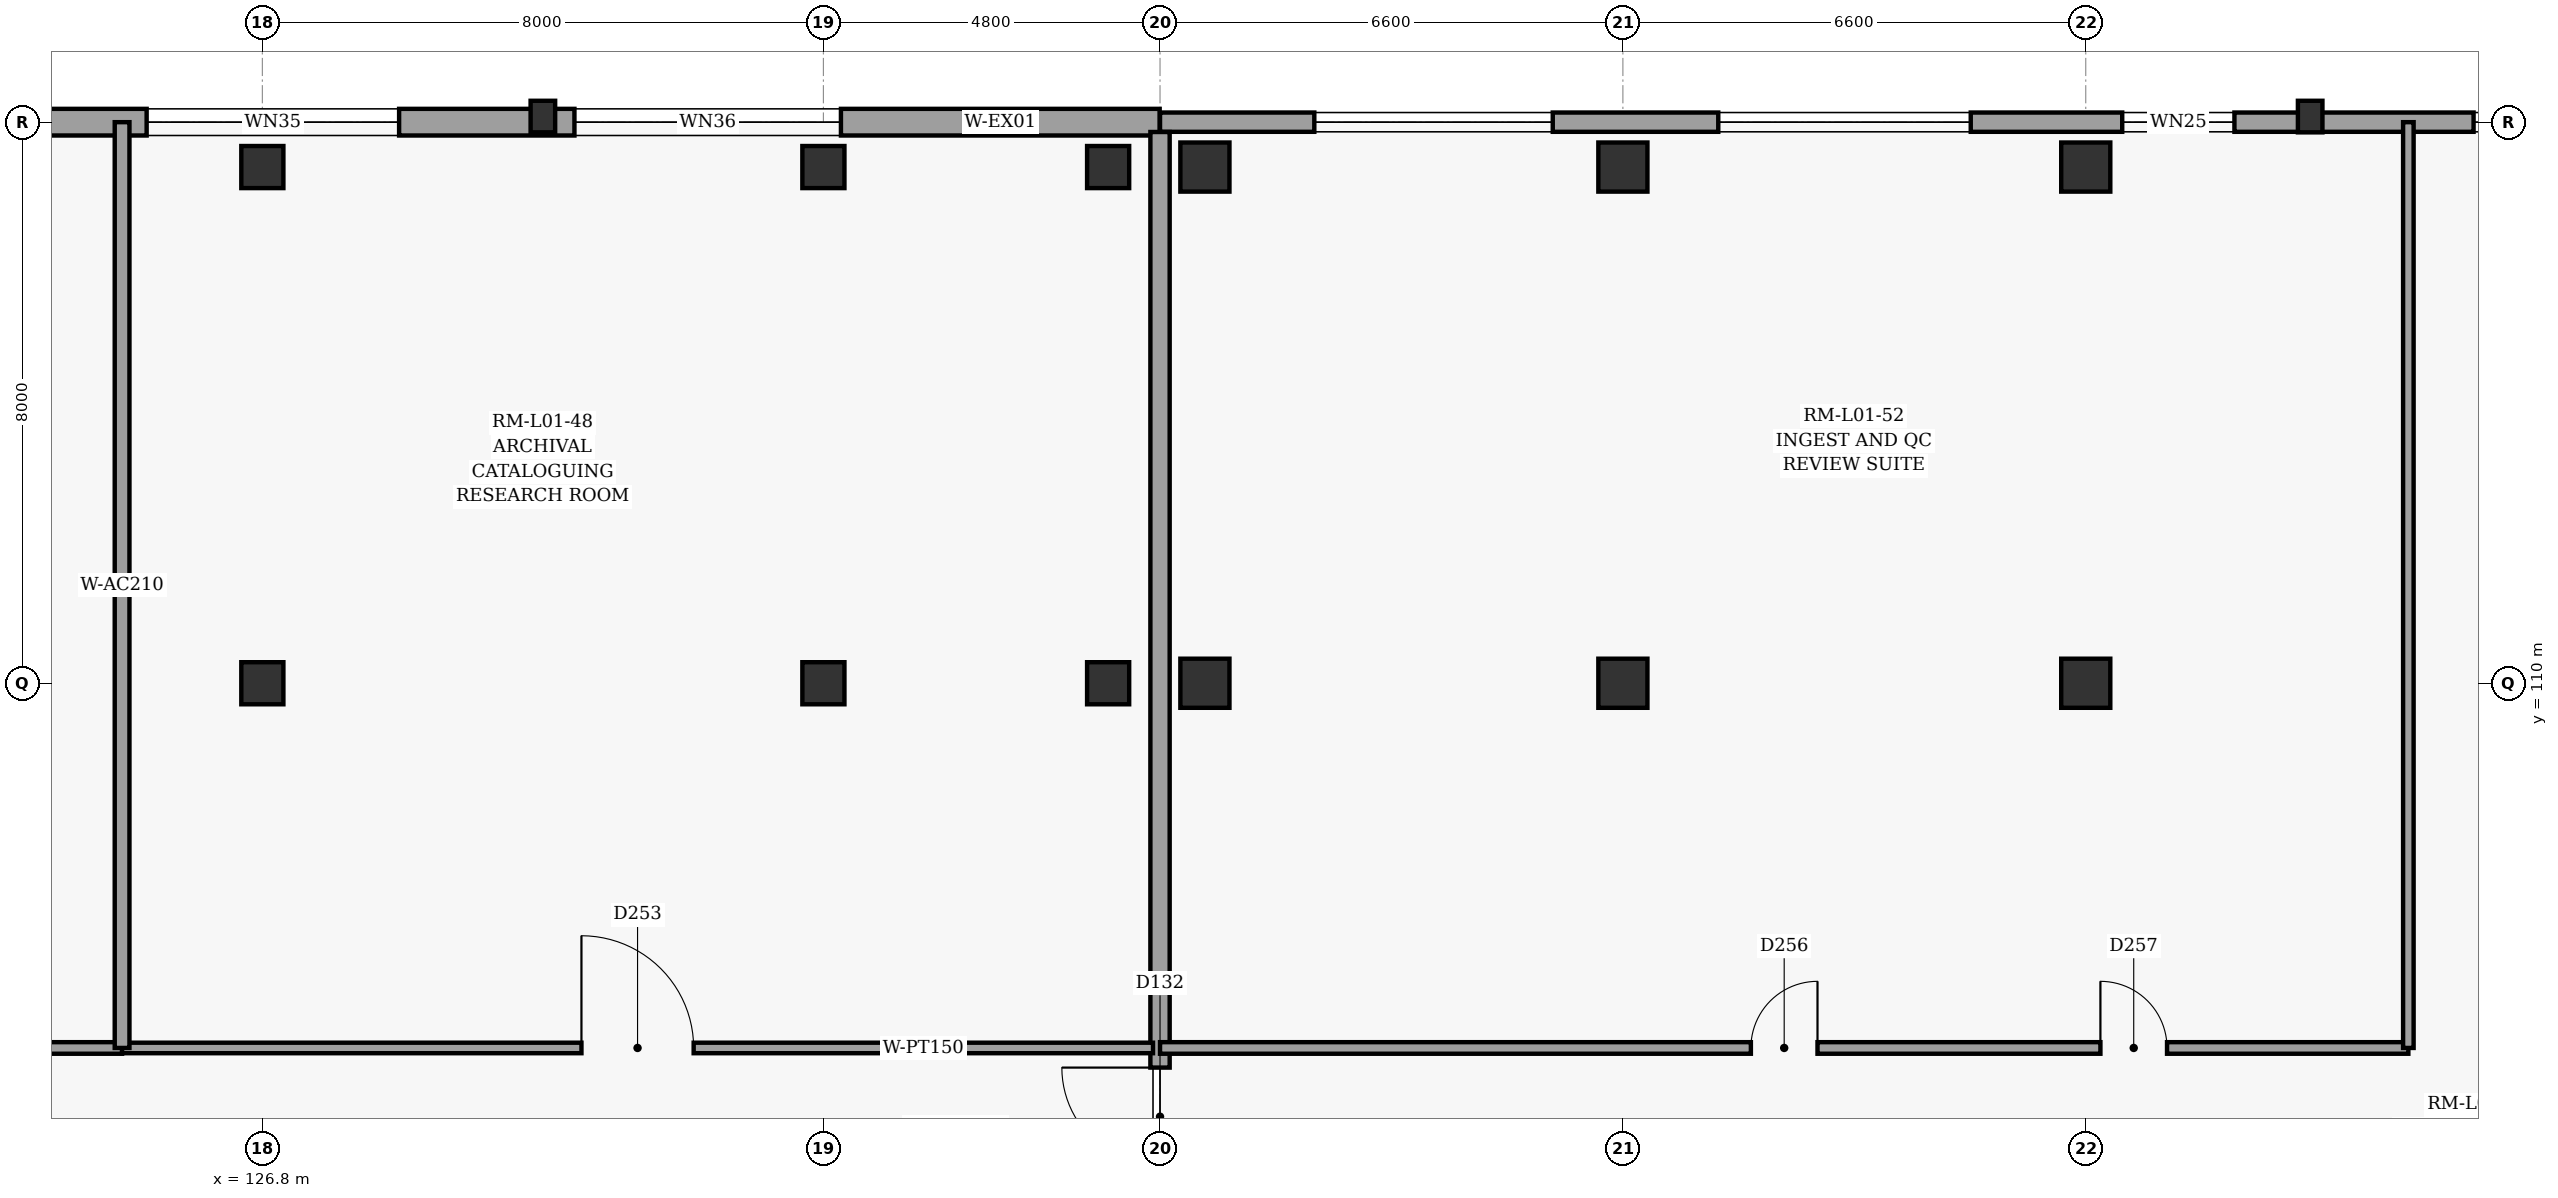
"""IFC4 building model, lengths in metres.
Left out: names, types, materials, properties, quantities, classifications, styles, units other than length and angle.
Written with IfcOpenShell. Run it as: python <this file> out.ifc"""

import sys

from ifc_helpers import new_model, si_unit, direction, frame, frame_2d, origin, origin_2d, place, context, subcontext, project, spatial, rectangle, extrude, element, fill, save


model = new_model("IFC4")
c1 = context("Model", 3, precision=1e-05, world=origin(), true_north=direction((0.0, 1.0)))
c2 = subcontext(c1, "Body", "Model", "MODEL_VIEW")
j1 = project(units=[si_unit("LENGTHUNIT", "METRE"), si_unit("PLANEANGLEUNIT", "RADIAN")], contexts=[c1])
p1 = place(None, origin())
s1 = spatial("IfcSite", under=j1, at=p1, CompositionType="ELEMENT")
p2 = place(p1, origin())
s2 = spatial("IfcBuilding", under=s1, at=p2, CompositionType="ELEMENT")
p3 = place(p2, frame((0.0, 0.0, 5.4)))
s3 = spatial("IfcBuildingStorey", under=s2, at=p3, CompositionType="ELEMENT", Elevation=5.4)
for number, where, z_axis, x_axis in (
    (1, (126.8, 110.0, 0.0), (0.0, 0.0, 1.0), (1.0, 0.0, 0.0)),
    (2, (126.8, 117.36, 0.0), (0.0, 0.0, 1.0), (1.0, 0.0, 0.0)),
    (3, (134.8, 110.0, 0.0), (0.0, 0.0, 1.0), (1.0, 0.0, 0.0)),
    (4, (134.8, 117.36, 0.0), (0.0, 0.0, 1.0), (1.0, 0.0, 0.0)),
    (5, (138.86, 110.0, 0.0), (0.0, 0.0, 1.0), (1.0, 0.0, 0.0)),
    (6, (138.86, 117.36, 0.0), (0.0, 0.0, 1.0), (1.0, 0.0, 0.0)),
):
    element("IfcColumn", number, at=place(p3, frame(where, z_axis=z_axis, x_axis=x_axis)), inside=s3, PredefinedType="COLUMN", context=c2, shape_type="SweptSolid", body=[
        extrude(rectangle(XDim=0.6, YDim=0.6, at=origin_2d()), origin(), (0.0, 0.0, 1.0), 4.8),
    ])
for number, where, z_axis, x_axis in (
    (7, (140.24, 110.0, 0.0), (0.0, 0.0, 1.0), (1.0, 0.0, 0.0)),
    (8, (140.24, 117.36, 0.0), (0.0, 0.0, 1.0), (1.0, 0.0, 0.0)),
    (9, (146.2, 110.0, 0.0), (0.0, 0.0, 1.0), (1.0, 0.0, 0.0)),
    (10, (146.2, 117.36, 0.0), (0.0, 0.0, 1.0), (1.0, 0.0, 0.0)),
    (11, (152.8, 110.0, 0.0), (0.0, 0.0, 1.0), (1.0, 0.0, 0.0)),
    (12, (152.8, 117.36, 0.0), (0.0, 0.0, 1.0), (1.0, 0.0, 0.0)),
):
    element("IfcColumn", number, at=place(p3, frame(where, z_axis=z_axis, x_axis=x_axis)), inside=s3, PredefinedType="COLUMN", context=c2, shape_type="SweptSolid", body=[
        extrude(rectangle(XDim=0.7, YDim=0.7, at=origin_2d()), origin(), (0.0, 0.0, 1.0), 4.8),
    ])
for number, where, z_axis, x_axis in (
    (13, (130.8, 118.08, 0.0), (0.0, 0.0, 1.0), (0.0, 1.0, 0.0)),
    (14, (156.0, 118.08, 0.0), (0.0, 0.0, 1.0), (0.0, 1.0, 0.0)),
):
    element("IfcColumn", number, at=place(p3, frame(where, z_axis=z_axis, x_axis=x_axis)), inside=s3, PredefinedType="PILASTER", context=c2, shape_type="SweptSolid", body=[
        extrude(rectangle(XDim=0.35, YDim=0.45, at=origin_2d()), origin(), (0.0, 0.0, 1.0), 4.8),
    ])
p4 = place(p3, frame((94.8, 118.0, 0.0), z_axis=(0.0, 0.0, 1.0), x_axis=(1.0, 0.0, 0.0)))
e15 = element("IfcWall", 15, at=p4, inside=s3, PredefinedType="SOLIDWALL", context=c2, shape_type="SweptSolid", body=[
    extrude(rectangle(XDim=44.795, YDim=0.38, at=frame_2d((22.397, 0.0))), origin(), (0.0, 0.0, 1.0), 4.54),
])
p5 = place(p4, frame((0.75, 0.0, 0.9)))
e16 = element("IfcOpeningElement", 16, at=p5, cuts=e15, PredefinedType="OPENING", context=c2, shape_type="SweptSolid", body=[
    extrude(rectangle(XDim=2.8, YDim=1.8, at=frame_2d((1.4, 0.9))), frame((0.0, 0.2, 0.0), z_axis=(0.0, -1.0, 0.0), x_axis=(1.0, 0.0, 0.0)), (0.0, 0.0, 1.0), 0.4),
])
p6 = place(p4, frame((8.3, 0.0, 0.9)))
e17 = element("IfcOpeningElement", 17, at=p6, cuts=e15, PredefinedType="OPENING", context=c2, shape_type="SweptSolid", body=[
    extrude(rectangle(XDim=3.0, YDim=1.8, at=frame_2d((1.5, 0.9))), frame((0.0, 0.2, 0.0), z_axis=(0.0, -1.0, 0.0), x_axis=(1.0, 0.0, 0.0)), (0.0, 0.0, 1.0), 0.4),
])
p7 = place(p4, frame((15.9, 0.0, 0.9)))
e18 = element("IfcOpeningElement", 18, at=p7, cuts=e15, PredefinedType="OPENING", context=c2, shape_type="SweptSolid", body=[
    extrude(rectangle(XDim=3.2, YDim=1.85, at=frame_2d((1.6, 0.925))), frame((0.0, 0.2, 0.0), z_axis=(0.0, -1.0, 0.0), x_axis=(1.0, 0.0, 0.0)), (0.0, 0.0, 1.0), 0.4),
])
p8 = place(p4, frame((22.75, 0.0, 0.9)))
e19 = element("IfcOpeningElement", 19, at=p8, cuts=e15, PredefinedType="OPENING", context=c2, shape_type="SweptSolid", body=[
    extrude(rectangle(XDim=3.4, YDim=1.85, at=frame_2d((1.7, 0.925))), frame((0.0, 0.2, 0.0), z_axis=(0.0, -1.0, 0.0), x_axis=(1.0, 0.0, 0.0)), (0.0, 0.0, 1.0), 0.4),
])
p9 = place(p4, frame((30.35, 0.0, 0.9)))
e20 = element("IfcOpeningElement", 20, at=p9, cuts=e15, PredefinedType="OPENING", context=c2, shape_type="SweptSolid", body=[
    extrude(rectangle(XDim=3.6, YDim=1.9, at=frame_2d((1.8, 0.95))), frame((0.0, 0.2, 0.0), z_axis=(0.0, -1.0, 0.0), x_axis=(1.0, 0.0, 0.0)), (0.0, 0.0, 1.0), 0.4),
])
p10 = place(p4, frame((36.45, 0.0, 0.9)))
e21 = element("IfcOpeningElement", 21, at=p10, cuts=e15, PredefinedType="OPENING", context=c2, shape_type="SweptSolid", body=[
    extrude(rectangle(XDim=3.8, YDim=1.9, at=frame_2d((1.9, 0.95))), frame((0.0, 0.2, 0.0), z_axis=(0.0, -1.0, 0.0), x_axis=(1.0, 0.0, 0.0)), (0.0, 0.0, 1.0), 0.4),
])
p11 = place(p3, frame((139.6, 118.0, 0.0), z_axis=(0.0, 0.0, 1.0), x_axis=(1.0, 0.0, 0.0)))
e22 = element("IfcWall", 22, at=p11, inside=s3, PredefinedType="SOLIDWALL", context=c2, shape_type="SweptSolid", body=[
    extrude(rectangle(XDim=32.4, YDim=0.275, at=frame_2d((16.2, 0.0))), origin(), (0.0, 0.0, 1.0), 4.55),
])
p12 = place(p11, frame((2.2, 0.0, 0.9)))
e23 = element("IfcOpeningElement", 23, at=p12, cuts=e22, PredefinedType="OPENING", context=c2, shape_type="SweptSolid", body=[
    extrude(rectangle(XDim=3.4, YDim=1.85, at=frame_2d((1.7, 0.925))), frame((0.0, 0.147, 0.0), z_axis=(0.0, -1.0, 0.0), x_axis=(1.0, 0.0, 0.0)), (0.0, 0.0, 1.0), 0.295),
])
p13 = place(p11, frame((7.96, 0.0, 0.9)))
e24 = element("IfcOpeningElement", 24, at=p13, cuts=e22, PredefinedType="OPENING", context=c2, shape_type="SweptSolid", body=[
    extrude(rectangle(XDim=3.6, YDim=1.9, at=frame_2d((1.8, 0.95))), frame((0.0, 0.147, 0.0), z_axis=(0.0, -1.0, 0.0), x_axis=(1.0, 0.0, 0.0)), (0.0, 0.0, 1.0), 0.295),
])
p14 = place(p11, frame((13.72, 0.0, 0.9)))
e25 = element("IfcOpeningElement", 25, at=p14, cuts=e22, PredefinedType="OPENING", context=c2, shape_type="SweptSolid", body=[
    extrude(rectangle(XDim=1.6, YDim=1.65, at=frame_2d((0.8, 0.825))), frame((0.0, 0.147, 0.0), z_axis=(0.0, -1.0, 0.0), x_axis=(1.0, 0.0, 0.0)), (0.0, 0.0, 1.0), 0.295),
])
p15 = place(p11, frame((18.73, 0.0, 0.9)))
e26 = element("IfcOpeningElement", 26, at=p15, cuts=e22, PredefinedType="OPENING", context=c2, shape_type="SweptSolid", body=[
    extrude(rectangle(XDim=2.6, YDim=2.35, at=frame_2d((1.3, 1.175))), frame((0.0, 0.147, 0.0), z_axis=(0.0, -1.0, 0.0), x_axis=(1.0, 0.0, 0.0)), (0.0, 0.0, 1.0), 0.295),
])
p16 = place(p3, frame((139.6, 71.74, 0.0), z_axis=(0.0, 0.0, 1.0), x_axis=(0.0, 1.0, 0.0)))
e27 = element("IfcWall", 27, at=p16, inside=s3, PredefinedType="SOLIDWALL", context=c2, shape_type="SweptSolid", body=[
    extrude(rectangle(XDim=46.12, YDim=0.275, at=frame_2d((23.06, 0.0))), origin(), (0.0, 0.0, 1.0), 3.69),
])
p17 = place(p16, frame((31.38, 0.0, 0.0)))
e28 = element("IfcOpeningElement", 28, at=p17, cuts=e27, PredefinedType="OPENING", context=c2, shape_type="SweptSolid", body=[
    extrude(rectangle(XDim=1.4, YDim=2.25, at=frame_2d((0.7, 1.125))), frame((0.0, 0.147, 0.0), z_axis=(0.0, -1.0, 0.0), x_axis=(1.0, 0.0, 0.0)), (0.0, 0.0, 1.0), 0.295),
])
p18 = place(p3, frame((109.8, 104.8, 0.0), z_axis=(0.0, 0.0, 1.0), x_axis=(1.0, 0.0, 0.0)))
e29 = element("IfcWall", 29, at=p18, inside=s3, PredefinedType="PARTITIONING", context=c2, shape_type="SweptSolid", body=[
    extrude(rectangle(XDim=15.0, YDim=0.165, at=frame_2d((7.5, 0.0))), origin(), (0.0, 0.0, 1.0), 4.54),
])
p19 = place(p18, frame((7.03, 0.0, 0.0)))
e30 = element("IfcOpeningElement", 30, at=p19, cuts=e29, PredefinedType="OPENING", context=c2, shape_type="SweptSolid", body=[
    extrude(rectangle(XDim=0.94, YDim=2.15, at=frame_2d((0.47, 1.075))), frame((0.0, 0.093, 0.0), z_axis=(0.0, -1.0, 0.0), x_axis=(1.0, 0.0, 0.0)), (0.0, 0.0, 1.0), 0.185),
])
p20 = place(p3, frame((124.8, 104.8, 0.0), z_axis=(0.0, 0.0, 1.0), x_axis=(1.0, 0.0, 0.0)))
e31 = element("IfcWall", 31, at=p20, inside=s3, PredefinedType="PARTITIONING", context=c2, shape_type="SweptSolid", body=[
    extrude(rectangle(XDim=14.7, YDim=0.15, at=frame_2d((7.35, 0.0))), origin(), (0.0, 0.0, 1.0), 4.54),
])
p21 = place(p20, frame((6.55, 0.0, 0.0)))
e32 = element("IfcOpeningElement", 32, at=p21, cuts=e31, PredefinedType="OPENING", context=c2, shape_type="SweptSolid", body=[
    extrude(rectangle(XDim=1.6, YDim=2.3, at=frame_2d((0.8, 1.15))), frame((0.0, 0.085, 0.0), z_axis=(0.0, -1.0, 0.0), x_axis=(1.0, 0.0, 0.0)), (0.0, 0.0, 1.0), 0.17),
])
p22 = place(p3, frame((124.8, 118.0, 0.0), z_axis=(0.0, 0.0, 1.0), x_axis=(0.0, -1.0, 0.0)))
e33 = element("IfcWall", 33, at=p22, inside=s3, PredefinedType="PARTITIONING", context=c2, shape_type="SweptSolid", body=[
    extrude(rectangle(XDim=13.2, YDim=0.21, at=frame_2d((6.6, 0.0))), origin(), (0.0, 0.0, 1.0), 4.54),
])
p23 = place(p3, frame((139.6, 104.8, 0.0), z_axis=(0.0, 0.0, 1.0), x_axis=(1.0, 0.0, 0.0)))
e34 = element("IfcWall", 34, at=p23, inside=s3, PredefinedType="PARTITIONING", context=c2, shape_type="SweptSolid", body=[
    extrude(rectangle(XDim=17.8, YDim=0.165, at=frame_2d((8.9, 0.0))), origin(), (0.0, 0.0, 1.0), 4.55),
])
p24 = place(p23, frame((8.425, 0.0, 0.0)))
e35 = element("IfcOpeningElement", 35, at=p24, cuts=e34, PredefinedType="OPENING", context=c2, shape_type="SweptSolid", body=[
    extrude(rectangle(XDim=0.95, YDim=2.1, at=frame_2d((0.475, 1.05))), frame((0.0, 0.093, 0.0), z_axis=(0.0, -1.0, 0.0), x_axis=(1.0, 0.0, 0.0)), (0.0, 0.0, 1.0), 0.185),
])
p25 = place(p23, frame((13.409, 0.0, 0.0)))
e36 = element("IfcOpeningElement", 36, at=p25, cuts=e34, PredefinedType="OPENING", context=c2, shape_type="SweptSolid", body=[
    extrude(rectangle(XDim=0.95, YDim=2.1, at=frame_2d((0.475, 1.05))), frame((0.0, 0.093, 0.0), z_axis=(0.0, -1.0, 0.0), x_axis=(1.0, 0.0, 0.0)), (0.0, 0.0, 1.0), 0.185),
])
p26 = place(p3, frame((157.4, 104.8, 0.0), z_axis=(0.0, 0.0, 1.0), x_axis=(0.0, 1.0, 0.0)))
e37 = element("IfcWall", 37, at=p26, inside=s3, PredefinedType="PARTITIONING", context=c2, shape_type="SweptSolid", body=[
    extrude(rectangle(XDim=13.2, YDim=0.15, at=frame_2d((6.6, 0.0))), origin(), (0.0, 0.0, 1.0), 4.55),
])
p27 = place(p9, origin())
e38 = element("IfcWindow", 38, at=p27, inside=s3, PartitioningType="SINGLE_PANEL", PredefinedType="WINDOW", context=c2, shape_type="SweptSolid", body=[
    extrude(rectangle(XDim=3.6, YDim=1.9, at=frame_2d((1.8, 0.95))), frame((0.0, 0.03, 0.0), z_axis=(0.0, -1.0, 0.0), x_axis=(1.0, 0.0, 0.0)), (0.0, 0.0, 1.0), 0.06),
])
fill(e20, e38)
p28 = place(p10, origin())
e39 = element("IfcWindow", 39, at=p28, inside=s3, PartitioningType="SINGLE_PANEL", PredefinedType="WINDOW", context=c2, shape_type="SweptSolid", body=[
    extrude(rectangle(XDim=3.8, YDim=1.9, at=frame_2d((1.9, 0.95))), frame((0.0, 0.03, 0.0), z_axis=(0.0, -1.0, 0.0), x_axis=(1.0, 0.0, 0.0)), (0.0, 0.0, 1.0), 0.06),
])
fill(e21, e39)
p29 = place(p12, origin())
e40 = element("IfcWindow", 40, at=p29, inside=s3, PartitioningType="SINGLE_PANEL", PredefinedType="WINDOW", context=c2, shape_type="SweptSolid", body=[
    extrude(rectangle(XDim=3.4, YDim=1.85, at=frame_2d((1.7, 0.925))), frame((0.0, 0.03, 0.0), z_axis=(0.0, -1.0, 0.0), x_axis=(1.0, 0.0, 0.0)), (0.0, 0.0, 1.0), 0.06),
])
fill(e23, e40)
p30 = place(p13, origin())
e41 = element("IfcWindow", 41, at=p30, inside=s3, PartitioningType="SINGLE_PANEL", PredefinedType="WINDOW", context=c2, shape_type="SweptSolid", body=[
    extrude(rectangle(XDim=3.6, YDim=1.9, at=frame_2d((1.8, 0.95))), frame((0.0, 0.03, 0.0), z_axis=(0.0, -1.0, 0.0), x_axis=(1.0, 0.0, 0.0)), (0.0, 0.0, 1.0), 0.06),
])
fill(e24, e41)
p31 = place(p14, origin())
e42 = element("IfcWindow", 42, at=p31, inside=s3, PartitioningType="SINGLE_PANEL", PredefinedType="WINDOW", context=c2, shape_type="SweptSolid", body=[
    extrude(rectangle(XDim=1.6, YDim=1.65, at=frame_2d((0.8, 0.825))), frame((0.0, 0.03, 0.0), z_axis=(0.0, -1.0, 0.0), x_axis=(1.0, 0.0, 0.0)), (0.0, 0.0, 1.0), 0.06),
])
fill(e25, e42)
p32 = place(p15, origin())
e43 = element("IfcWindow", 43, at=p32, inside=s3, PartitioningType="SINGLE_PANEL", PredefinedType="WINDOW", context=c2, shape_type="SweptSolid", body=[
    extrude(rectangle(XDim=2.6, YDim=2.35, at=frame_2d((1.3, 1.175))), frame((0.0, 0.03, 0.0), z_axis=(0.0, -1.0, 0.0), x_axis=(1.0, 0.0, 0.0)), (0.0, 0.0, 1.0), 0.06),
])
fill(e26, e43)
p33 = place(p17, origin())
e44 = element("IfcDoor", 44, at=p33, inside=s3, OperationType="SINGLE_SWING_RIGHT", PredefinedType="DOOR", context=c2, shape_type="SweptSolid", body=[
    extrude(rectangle(XDim=1.4, YDim=2.25, at=frame_2d((0.7, 1.125))), frame((0.0, 0.025, 0.0), z_axis=(0.0, -1.0, 0.0), x_axis=(1.0, 0.0, 0.0)), (0.0, 0.0, 1.0), 0.05),
])
fill(e28, e44)
p34 = place(p21, origin())
e45 = element("IfcDoor", 45, at=p34, inside=s3, OperationType="SINGLE_SWING_LEFT", PredefinedType="DOOR", context=c2, shape_type="SweptSolid", body=[
    extrude(rectangle(XDim=1.6, YDim=2.3, at=frame_2d((0.8, 1.15))), frame((0.0, 0.025, 0.0), z_axis=(0.0, -1.0, 0.0), x_axis=(1.0, 0.0, 0.0)), (0.0, 0.0, 1.0), 0.05),
])
fill(e32, e45)
p35 = place(p24, origin())
e46 = element("IfcDoor", 46, at=p35, inside=s3, OperationType="SINGLE_SWING_RIGHT", PredefinedType="DOOR", context=c2, shape_type="SweptSolid", body=[
    extrude(rectangle(XDim=0.95, YDim=2.1, at=frame_2d((0.475, 1.05))), frame((0.0, 0.025, 0.0), z_axis=(0.0, -1.0, 0.0), x_axis=(1.0, 0.0, 0.0)), (0.0, 0.0, 1.0), 0.05),
])
fill(e35, e46)
p36 = place(p25, origin())
e47 = element("IfcDoor", 47, at=p36, inside=s3, OperationType="SINGLE_SWING_LEFT", PredefinedType="DOOR", context=c2, shape_type="SweptSolid", body=[
    extrude(rectangle(XDim=0.95, YDim=2.1, at=frame_2d((0.475, 1.05))), frame((0.0, 0.025, 0.0), z_axis=(0.0, -1.0, 0.0), x_axis=(1.0, 0.0, 0.0)), (0.0, 0.0, 1.0), 0.05),
])
fill(e36, e47)
save(model, sys.argv[1])
